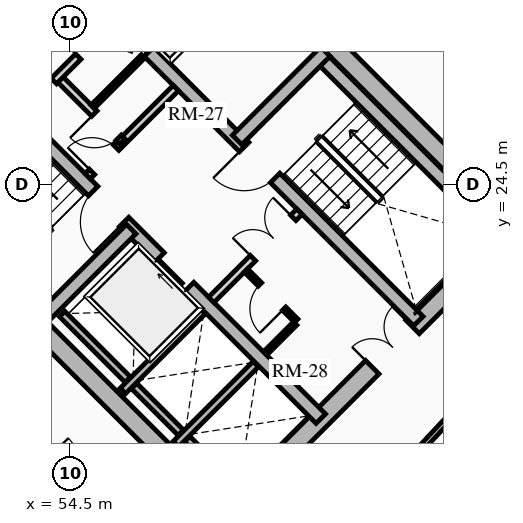
"""IFC4 building model, lengths in metres.
Left out: names, types, materials, properties, quantities, classifications, styles, units other than length and angle.
Written with IfcOpenShell. Run it as: python <this file> out.ifc"""

import sys

from ifc_helpers import new_model, si_unit, direction, frame, frame_2d, origin, place, context, subcontext, project, spatial, rectangle, extrude, source, transform, mapped, element, fill, save


model = new_model("IFC4")
c1 = context("Model", 3, precision=1e-05, world=origin(), true_north=direction((0.0, 1.0)))
c2 = subcontext(c1, "Body", "Model", "MODEL_VIEW")
j1 = project(units=[si_unit("LENGTHUNIT", "METRE"), si_unit("PLANEANGLEUNIT", "RADIAN")], contexts=[c1])
p1 = place(None, origin())
s1 = spatial("IfcSite", under=j1, at=p1, CompositionType="ELEMENT")
p2 = place(p1, origin())
s2 = spatial("IfcBuilding", under=s1, at=p2, CompositionType="ELEMENT")
p3 = place(p2, frame((0.0, 0.0, 36.55)))
s3 = spatial("IfcBuildingStorey", under=s2, at=p3, CompositionType="ELEMENT", Elevation=36.55)
for number, where, z_axis, x_axis in (
    (1, (58.773, 15.661, 0.0), (0.0, 0.0, 1.0), (-0.707, 0.707, 0.0)),
    (2, (66.339, 23.227, 0.0), (0.0, 0.0, 1.0), (-0.707, 0.707, 0.0)),
):
    element("IfcWall", number, at=place(p3, frame(where, z_axis=z_axis, x_axis=x_axis)), inside=s3, PredefinedType="SHEAR", context=c2, shape_type="SweptSolid", body=[
        extrude(rectangle(XDim=14.3, YDim=0.5, at=frame_2d((7.15, 0.0))), origin(), (0.0, 0.0, 1.0), 2.91),
    ])
p4 = place(p3, frame((58.596, 15.838, 0.0), z_axis=(0.0, 0.0, 1.0), x_axis=(0.707106781187, 0.707106781187, 0.0)))
e3 = element("IfcWall", 3, at=p4, inside=s3, PredefinedType="SHEAR", context=c2, shape_type="SweptSolid", body=[
    extrude(rectangle(XDim=10.7, YDim=0.5, at=frame_2d((5.35, 0.0))), origin(), (0.0, 0.0, 1.0), 2.91),
])
m1 = source(origin(), c2, "Body", "SweptSolid", [
    extrude(rectangle(XDim=1.5, YDim=2.02, at=frame_2d((0.75, 1.01))), frame((0.0, 0.26, 0.0), z_axis=(0.0, -1.0, 0.0), x_axis=(1.0, 0.0, 0.0)), (0.0, 0.0, 1.0), 0.52),
])
p5 = place(p4, frame((5.45, 0.0, 0.0)))
e4 = element("IfcOpeningElement", 4, at=p5, cuts=e3, PredefinedType="OPENING", context=c2, shape_type="MappedRepresentation", body=[
    mapped(m1, transform((0.0, 0.0, 0.0), x_axis=(1.0, 0.0, 0.0), y_axis=(0.0, 1.0, 0.0), z_axis=(0.0, 0.0, 1.0), scale=1.0)),
])
p6 = place(p3, frame((48.838, 25.596, 0.0), z_axis=(0.0, 0.0, 1.0), x_axis=(0.707106781187, 0.707106781187, 0.0)))
e5 = element("IfcWall", 5, at=p6, inside=s3, PredefinedType="SHEAR", context=c2, shape_type="SweptSolid", body=[
    extrude(rectangle(XDim=10.7, YDim=0.5, at=frame_2d((5.35, 0.0))), origin(), (0.0, 0.0, 1.0), 2.91),
])
p7 = place(p6, frame((4.6, 0.0, 0.0)))
e6 = element("IfcOpeningElement", 6, at=p7, cuts=e5, PredefinedType="OPENING", context=c2, shape_type="MappedRepresentation", body=[
    mapped(m1, transform((0.0, 0.0, 0.0), x_axis=(1.0, 0.0, 0.0), y_axis=(0.0, 1.0, 0.0), z_axis=(0.0, 0.0, 1.0), scale=1.0)),
])
p8 = place(p3, frame((61.096, 18.338, 0.0), z_axis=(0.0, 0.0, 1.0), x_axis=(-0.707106781187, 0.707106781187, 0.0)))
e7 = element("IfcWall", 7, at=p8, inside=s3, PredefinedType="SHEAR", context=c2, shape_type="SweptSolid", body=[
    extrude(rectangle(XDim=13.8, YDim=0.35, at=frame_2d((6.9, 0.0))), origin(), (0.0, 0.0, 1.0), 2.91),
])
m2 = source(origin(), c2, "Body", "SweptSolid", [
    extrude(rectangle(XDim=1.1, YDim=2.015, at=frame_2d((0.55, 1.007))), frame((0.0, 0.185, 0.0), z_axis=(0.0, -1.0, 0.0), x_axis=(1.0, 0.0, 0.0)), (0.0, 0.0, 1.0), 0.37),
])
p9 = place(p8, frame((4.9, 0.0, 0.0)))
e8 = element("IfcOpeningElement", 8, at=p9, cuts=e7, PredefinedType="OPENING", context=c2, shape_type="MappedRepresentation", body=[
    mapped(m2, transform((0.0, 0.0, 0.0), x_axis=(1.0, 0.0, 0.0), y_axis=(0.0, 1.0, 0.0), z_axis=(0.0, 0.0, 1.0), scale=1.0)),
])
m3 = source(origin(), c2, "Body", "SweptSolid", [
    extrude(rectangle(XDim=1.15, YDim=2.02, at=frame_2d((0.575, 1.01))), frame((0.0, 0.185, 0.0), z_axis=(0.0, -1.0, 0.0), x_axis=(1.0, 0.0, 0.0)), (0.0, 0.0, 1.0), 0.37),
])
p10 = place(p8, frame((7.32, 0.0, 0.0)))
e9 = element("IfcOpeningElement", 9, at=p10, cuts=e7, PredefinedType="OPENING", context=c2, shape_type="MappedRepresentation", body=[
    mapped(m3, transform((0.0, 0.0, 0.0), x_axis=(1.0, 0.0, 0.0), y_axis=(0.0, 1.0, 0.0), z_axis=(0.0, 0.0, 1.0), scale=1.0)),
])
p11 = place(p3, frame((63.662, 20.904, 0.0), z_axis=(0.0, 0.0, 1.0), x_axis=(-0.707106781187, 0.707106781187, 0.0)))
e10 = element("IfcWall", 10, at=p11, inside=s3, PredefinedType="SHEAR", context=c2, shape_type="SweptSolid", body=[
    extrude(rectangle(XDim=13.8, YDim=0.35, at=frame_2d((6.9, 0.0))), origin(), (0.0, 0.0, 1.0), 2.91),
])
p12 = place(p11, frame((10.025, 0.0, 0.0)))
e11 = element("IfcOpeningElement", 11, at=p12, cuts=e10, PredefinedType="OPENING", context=c2, shape_type="MappedRepresentation", body=[
    mapped(m2, transform((0.0, 0.0, 0.0), x_axis=(1.0, 0.0, 0.0), y_axis=(0.0, 1.0, 0.0), z_axis=(0.0, 0.0, 1.0), scale=1.0)),
])
p13 = place(p11, frame((12.025, 0.0, 0.0)))
e12 = element("IfcOpeningElement", 12, at=p13, cuts=e10, PredefinedType="OPENING", context=c2, shape_type="MappedRepresentation", body=[
    mapped(m2, transform((0.0, 0.0, 0.0), x_axis=(1.0, 0.0, 0.0), y_axis=(0.0, 1.0, 0.0), z_axis=(0.0, 0.0, 1.0), scale=1.0)),
])
p14 = place(p11, frame((5.33, 0.0, 0.0)))
e13 = element("IfcOpeningElement", 13, at=p14, cuts=e10, PredefinedType="OPENING", context=c2, shape_type="MappedRepresentation", body=[
    mapped(m3, transform((0.0, 0.0, 0.0), x_axis=(1.0, 0.0, 0.0), y_axis=(0.0, 1.0, 0.0), z_axis=(0.0, 0.0, 1.0), scale=1.0)),
])
p15 = place(p3, frame((53.922, 21.141, 0.0), z_axis=(0.0, 0.0, 1.0), x_axis=(-0.707106781187, 0.707106781187, 0.0)))
e14 = element("IfcWall", 14, at=p15, inside=s3, PredefinedType="SHEAR", context=c2, shape_type="SweptSolid", body=[
    extrude(rectangle(XDim=6.745, YDim=0.35, at=frame_2d((3.373, 0.0))), origin(), (0.0, 0.0, 1.0), 2.91),
])
p16 = place(p3, frame((53.784, 21.003, 0.0), z_axis=(0.0, 0.0, 1.0), x_axis=(0.707106781187, 0.707106781187, 0.0)))
e15 = element("IfcWall", 15, at=p16, inside=s3, PredefinedType="SHEAR", context=c2, shape_type="SweptSolid", body=[
    extrude(rectangle(XDim=3.285, YDim=0.35, at=frame_2d((1.643, 0.0))), origin(), (0.0, 0.0, 1.0), 2.91),
])
p17 = place(p3, frame((65.847, 23.089, 0.0), z_axis=(0.0, 0.0, 1.0), x_axis=(-0.707106781187, 0.707106781187, 0.0)))
e16 = element("IfcWall", 16, at=p17, inside=s3, PredefinedType="SHEAR", context=c2, shape_type="SweptSolid", body=[
    extrude(rectangle(XDim=6.745, YDim=0.35, at=frame_2d((3.373, 0.0))), origin(), (0.0, 0.0, 1.0), 2.91),
])
p18 = place(p3, frame((58.893, 25.674, 0.0), z_axis=(0.0, 0.0, 1.0), x_axis=(0.707106781187, 0.707106781187, 0.0)))
e17 = element("IfcWall", 17, at=p18, inside=s3, PredefinedType="SHEAR", context=c2, shape_type="SweptSolid", body=[
    extrude(rectangle(XDim=3.285, YDim=0.35, at=frame_2d((1.643, 0.0))), origin(), (0.0, 0.0, 1.0), 2.91),
])
p19 = place(p3, frame((55.888, 19.069, 0.0), z_axis=(0.0, 0.0, 1.0), x_axis=(0.707106781187, 0.707106781187, 0.0)))
e18 = element("IfcWall", 18, at=p19, inside=s3, PredefinedType="SHEAR", context=c2, shape_type="SweptSolid", body=[
    extrude(rectangle(XDim=2.97, YDim=0.2, at=frame_2d((1.485, 0.0))), origin(), (0.0, 0.0, 1.0), 2.91),
])
p20 = place(p3, frame((56.015, 19.366, 0.0), z_axis=(0.0, 0.0, 1.0), x_axis=(-0.707106781187, 0.707106781187, 0.0)))
e19 = element("IfcWall", 19, at=p20, inside=s3, PredefinedType="SHEAR", context=c2, shape_type="SweptSolid", body=[
    extrude(rectangle(XDim=2.44, YDim=0.2, at=frame_2d((1.22, 0.0))), origin(), (0.0, 0.0, 1.0), 2.91),
])
p21 = place(p3, frame((57.284, 17.673, 0.0), z_axis=(0.0, 0.0, 1.0), x_axis=(0.707147878904, 0.70706568108, 0.0)))
e20 = element("IfcWall", 20, at=p21, inside=s3, PredefinedType="SHEAR", context=c2, shape_type="SweptSolid", body=[
    extrude(rectangle(XDim=2.97, YDim=0.2, at=frame_2d((1.485, 0.0))), origin(), (0.0, 0.0, 1.0), 2.91),
])
p22 = place(p3, frame((57.412, 17.97, 0.0), z_axis=(0.0, 0.0, 1.0), x_axis=(-0.707106781187, 0.707106781187, 0.0)))
e21 = element("IfcWall", 21, at=p22, inside=s3, PredefinedType="SHEAR", context=c2, shape_type="SweptSolid", body=[
    extrude(rectangle(XDim=1.735, YDim=0.2, at=frame_2d((0.867, 0.0))), origin(), (0.0, 0.0, 1.0), 2.91),
])
p23 = place(p3, frame((58.737, 16.644, 0.0), z_axis=(0.0, 0.0, 1.0), x_axis=(-0.707032117043, 0.707181437447, 0.0)))
e22 = element("IfcWall", 22, at=p23, inside=s3, PredefinedType="SHEAR", context=c2, shape_type="SweptSolid", body=[
    extrude(rectangle(XDim=1.635, YDim=0.2, at=frame_2d((0.817, 0.0))), origin(), (0.0, 0.0, 1.0), 2.91),
])
p24 = place(p3, frame((57.062, 27.781, 0.0), z_axis=(0.0, 0.0, 1.0), x_axis=(0.707106781187, 0.707106781187, 0.0)))
e23 = element("IfcWall", 23, at=p24, inside=s3, PredefinedType="SHEAR", context=c2, shape_type="SweptSolid", body=[
    extrude(rectangle(XDim=2.97, YDim=0.2, at=frame_2d((1.485, 0.0))), origin(), (0.0, 0.0, 1.0), 2.91),
])
p25 = place(p3, frame((58.214, 21.467, 0.0), z_axis=(0.0, 0.0, 1.0), x_axis=(0.707106781187, 0.707106781187, 0.0)))
e24 = element("IfcWall", 24, at=p25, inside=s3, PredefinedType="PARTITIONING", context=c2, shape_type="SweptSolid", body=[
    extrude(rectangle(XDim=3.28, YDim=0.2, at=frame_2d((1.64, 0.0))), origin(), (0.0, 0.0, 1.0), 2.635),
])
m4 = source(origin(), c2, "Body", "SweptSolid", [
    extrude(rectangle(XDim=1.5, YDim=2.02, at=frame_2d((0.75, 1.01))), frame((0.0, 0.11, 0.0), z_axis=(0.0, -1.0, 0.0), x_axis=(1.0, 0.0, 0.0)), (0.0, 0.0, 1.0), 0.22),
])
p26 = place(p25, frame((1.55, 0.0, 0.0)))
e25 = element("IfcOpeningElement", 25, at=p26, cuts=e24, PredefinedType="OPENING", context=c2, shape_type="MappedRepresentation", body=[
    mapped(m4, transform((0.0, 0.0, 0.0), x_axis=(1.0, 0.0, 0.0), y_axis=(0.0, 1.0, 0.0), z_axis=(0.0, 0.0, 1.0), scale=1.0)),
])
p27 = place(p3, frame((54.961, 24.719, 0.0), z_axis=(0.0, 0.0, 1.0), x_axis=(0.707106781187, 0.707106781187, 0.0)))
e26 = element("IfcWall", 26, at=p27, inside=s3, PredefinedType="PARTITIONING", context=c2, shape_type="SweptSolid", body=[
    extrude(rectangle(XDim=3.28, YDim=0.2, at=frame_2d((1.64, 0.0))), origin(), (0.0, 0.0, 1.0), 2.635),
])
m5 = source(origin(), c2, "Body", "SweptSolid", [
    extrude(rectangle(XDim=0.9, YDim=2.005, at=frame_2d((0.45, 1.002))), frame((0.0, 0.11, 0.0), z_axis=(0.0, -1.0, 0.0), x_axis=(1.0, 0.0, 0.0)), (0.0, 0.0, 1.0), 0.22),
])
p28 = place(p27, frame((0.16, 0.0, 0.0)))
e27 = element("IfcOpeningElement", 27, at=p28, cuts=e26, PredefinedType="OPENING", context=c2, shape_type="MappedRepresentation", body=[
    mapped(m5, transform((0.0, 0.0, 0.0), x_axis=(1.0, 0.0, 0.0), y_axis=(0.0, 1.0, 0.0), z_axis=(0.0, 0.0, 1.0), scale=1.0)),
])
p29 = place(p3, frame((55.874, 25.631, 0.0), z_axis=(0.0, 0.0, 1.0), x_axis=(-0.707157639372, 0.707055919343, 0.0)))
e28 = element("IfcWall", 28, at=p29, inside=s3, PredefinedType="PARTITIONING", context=c2, shape_type="SweptSolid", body=[
    extrude(rectangle(XDim=2.4, YDim=0.2, at=frame_2d((1.2, 0.0))), origin(), (0.0, 0.0, 1.0), 2.635),
])
p30 = place(p29, frame((0.14, 0.0, 0.0)))
e29 = element("IfcOpeningElement", 29, at=p30, cuts=e28, PredefinedType="OPENING", context=c2, shape_type="MappedRepresentation", body=[
    mapped(m5, transform((0.0, 0.0, 0.0), x_axis=(1.0, 0.0, 0.0), y_axis=(0.0, 1.0, 0.0), z_axis=(0.0, 0.0, 1.0), scale=1.0)),
])
p31 = place(p3, frame((53.264, 26.416, 0.0), z_axis=(0.0, 0.0, 1.0), x_axis=(0.707106781187, 0.707106781187, 0.0)))
e30 = element("IfcWall", 30, at=p31, inside=s3, PredefinedType="PARTITIONING", context=c2, shape_type="SweptSolid", body=[
    extrude(rectangle(XDim=3.28, YDim=0.2, at=frame_2d((1.64, 0.0))), origin(), (0.0, 0.0, 1.0), 2.635),
])
m6 = source(origin(), c2, "Body", "SweptSolid", [
    extrude(rectangle(XDim=1.0, YDim=2.015, at=frame_2d((0.5, 1.007))), frame((0.0, 0.11, 0.0), z_axis=(0.0, -1.0, 0.0), x_axis=(1.0, 0.0, 0.0)), (0.0, 0.0, 1.0), 0.22),
])
p32 = place(p31, frame((0.14, 0.0, 0.0)))
e31 = element("IfcOpeningElement", 31, at=p32, cuts=e30, PredefinedType="OPENING", context=c2, shape_type="MappedRepresentation", body=[
    mapped(m6, transform((0.0, 0.0, 0.0), x_axis=(1.0, 0.0, 0.0), y_axis=(0.0, 1.0, 0.0), z_axis=(0.0, 0.0, 1.0), scale=1.0)),
])
p33 = place(p31, frame((2.05, 0.0, 0.0)))
e32 = element("IfcOpeningElement", 32, at=p33, cuts=e30, PredefinedType="OPENING", context=c2, shape_type="MappedRepresentation", body=[
    mapped(m5, transform((0.0, 0.0, 0.0), x_axis=(1.0, 0.0, 0.0), y_axis=(0.0, 1.0, 0.0), z_axis=(0.0, 0.0, 1.0), scale=1.0)),
])
p34 = place(p3, frame((60.448, 20.915, 0.0), z_axis=(0.0, 0.0, 1.0), x_axis=(-0.707106781187, 0.707106781187, 0.0)))
e33 = element("IfcWall", 33, at=p34, inside=s3, PredefinedType="PARTITIONING", context=c2, shape_type="SweptSolid", body=[
    extrude(rectangle(XDim=1.87, YDim=0.125, at=frame_2d((0.935, 0.0))), origin(), (0.0, 0.0, 1.0), 2.635),
])
m7 = source(origin(), c2, "Body", "SweptSolid", [
    extrude(rectangle(XDim=0.9, YDim=2.005, at=frame_2d((0.45, 1.002))), frame((0.0, 0.073, 0.0), z_axis=(0.0, -1.0, 0.0), x_axis=(1.0, 0.0, 0.0)), (0.0, 0.0, 1.0), 0.145),
])
p35 = place(p34, frame((0.45, 0.0, 0.0)))
e34 = element("IfcOpeningElement", 34, at=p35, cuts=e33, PredefinedType="OPENING", context=c2, shape_type="MappedRepresentation", body=[
    mapped(m7, transform((0.0, 0.0, 0.0), x_axis=(1.0, 0.0, 0.0), y_axis=(0.0, 1.0, 0.0), z_axis=(0.0, 0.0, 1.0), scale=1.0)),
])
p36 = place(p3, frame((59.643, 20.066, 0.0), z_axis=(0.0, 0.0, 1.0), x_axis=(0.707106781187, 0.707106781187, 0.0)))
e35 = element("IfcWall", 35, at=p36, inside=s3, PredefinedType="PARTITIONING", context=c2, shape_type="SweptSolid", body=[
    extrude(rectangle(XDim=1.1, YDim=0.125, at=frame_2d((0.55, 0.0))), origin(), (0.0, 0.0, 1.0), 2.635),
])
p37 = place(p3, frame((55.089, 26.543, 0.0), z_axis=(0.0, 0.0, 1.0), x_axis=(0.707106781187, 0.707106781187, 0.0)))
e36 = element("IfcWall", 36, at=p37, inside=s3, PredefinedType="PARTITIONING", context=c2, shape_type="SweptSolid", body=[
    extrude(rectangle(XDim=1.88, YDim=0.125, at=frame_2d((0.94, 0.0))), origin(), (0.0, 0.0, 1.0), 2.635),
])
p38 = place(p3, frame((51.914, 18.914, 0.0), z_axis=(0.0, 0.0, 1.0), x_axis=(0.699999313799, -0.714143515465, 0.0)))
e37 = element("IfcWall", 37, at=p38, inside=s3, PredefinedType="PARTITIONING", context=c2, shape_type="SweptSolid", body=[
    extrude(rectangle(XDim=6.162, YDim=0.15, at=frame_2d((3.081, 0.0))), origin(), (0.0, 0.0, 1.0), 2.159),
])
m8 = source(origin(), c2, "Body", "SweptSolid", [
    extrude(rectangle(XDim=1.05, YDim=2.015, at=frame_2d((0.525, 1.007))), frame((0.0, 0.085, 0.0), z_axis=(0.0, -1.0, 0.0), x_axis=(1.0, 0.0, 0.0)), (0.0, 0.0, 1.0), 0.17),
])
p39 = place(p38, frame((2.556, 0.0, 0.0)))
e38 = element("IfcOpeningElement", 38, at=p39, cuts=e37, PredefinedType="OPENING", context=c2, shape_type="MappedRepresentation", body=[
    mapped(m8, transform((0.0, 0.0, 0.0), x_axis=(1.0, 0.0, 0.0), y_axis=(0.0, 1.0, 0.0), z_axis=(0.0, 0.0, 1.0), scale=1.0)),
])
p40 = place(p3, frame((62.903, 16.667, 0.0), z_axis=(0.0, 0.0, 1.0), x_axis=(0.682371947497, 0.731005147225, 0.0)))
e39 = element("IfcWall", 39, at=p40, inside=s3, PredefinedType="PARTITIONING", context=c2, shape_type="SweptSolid", body=[
    extrude(rectangle(XDim=6.642, YDim=0.15, at=frame_2d((3.321, 0.0))), origin(), (0.0, 0.0, 1.0), 2.159),
])
p41 = place(p3, frame((67.27, 25.78, 0.0), z_axis=(0.0, 0.0, 1.0), x_axis=(-0.696847842907, 0.717218992942, 0.0)))
e40 = element("IfcWall", 40, at=p41, inside=s3, PredefinedType="PARTITIONING", context=c2, shape_type="SweptSolid", body=[
    extrude(rectangle(XDim=6.004, YDim=0.15, at=frame_2d((3.002, 0.0))), origin(), (0.0, 0.0, 1.0), 2.635),
])
m9 = source(origin(), c2, "Body", "SweptSolid", [
    extrude(rectangle(XDim=1.0, YDim=2.015, at=frame_2d((0.5, 1.007))), frame((0.0, 0.085, 0.0), z_axis=(0.0, -1.0, 0.0), x_axis=(1.0, 0.0, 0.0)), (0.0, 0.0, 1.0), 0.17),
])
p42 = place(p41, frame((2.502, 0.0, 0.0)))
e41 = element("IfcOpeningElement", 41, at=p42, cuts=e40, PredefinedType="OPENING", context=c2, shape_type="MappedRepresentation", body=[
    mapped(m9, transform((0.0, 0.0, 0.0), x_axis=(1.0, 0.0, 0.0), y_axis=(0.0, 1.0, 0.0), z_axis=(0.0, 0.0, 1.0), scale=1.0)),
])
m10 = source(origin(), c2, "Body", "SweptSolid", [
    extrude(rectangle(XDim=1.1, YDim=2.015, at=frame_2d((0.55, 1.007))), frame((0.0, 0.025, 0.0), z_axis=(0.0, -1.0, 0.0), x_axis=(1.0, 0.0, 0.0)), (0.0, 0.0, 1.0), 0.05),
])
p43 = place(p9, origin())
e42 = element("IfcDoor", 42, at=p43, inside=s3, OperationType="SLIDING_TO_RIGHT", PredefinedType="DOOR", context=c2, shape_type="MappedRepresentation", body=[
    mapped(m10, transform((0.0, 0.0, 0.0), x_axis=(1.0, 0.0, 0.0), y_axis=(0.0, 1.0, 0.0), z_axis=(0.0, 0.0, 1.0), scale=1.0)),
])
fill(e8, e42)
m11 = source(origin(), c2, "Body", "SweptSolid", [
    extrude(rectangle(XDim=1.15, YDim=2.02, at=frame_2d((0.575, 1.01))), frame((0.0, 0.025, 0.0), z_axis=(0.0, -1.0, 0.0), x_axis=(1.0, 0.0, 0.0)), (0.0, 0.0, 1.0), 0.05),
])
p44 = place(p10, origin())
e43 = element("IfcDoor", 43, at=p44, inside=s3, OperationType="SINGLE_SWING_LEFT", PredefinedType="DOOR", context=c2, shape_type="MappedRepresentation", body=[
    mapped(m11, transform((0.0, 0.0, 0.0), x_axis=(1.0, 0.0, 0.0), y_axis=(0.0, 1.0, 0.0), z_axis=(0.0, 0.0, 1.0), scale=1.0)),
])
fill(e9, e43)
p45 = place(p14, origin())
e44 = element("IfcDoor", 44, at=p45, inside=s3, OperationType="SINGLE_SWING_RIGHT", PredefinedType="DOOR", context=c2, shape_type="MappedRepresentation", body=[
    mapped(m11, transform((0.0, 0.0, 0.0), x_axis=(1.0, 0.0, 0.0), y_axis=(0.0, 1.0, 0.0), z_axis=(0.0, 0.0, 1.0), scale=1.0)),
])
fill(e13, e44)
m12 = source(origin(), c2, "Body", "SweptSolid", [
    extrude(rectangle(XDim=1.5, YDim=2.02, at=frame_2d((0.75, 1.01))), frame((0.0, 0.025, 0.0), z_axis=(0.0, -1.0, 0.0), x_axis=(1.0, 0.0, 0.0)), (0.0, 0.0, 1.0), 0.05),
])
p46 = place(p5, origin())
e45 = element("IfcDoor", 45, at=p46, inside=s3, OperationType="DOUBLE_DOOR_SINGLE_SWING", PredefinedType="DOOR", context=c2, shape_type="MappedRepresentation", body=[
    mapped(m12, transform((0.0, 0.0, 0.0), x_axis=(1.0, 0.0, 0.0), y_axis=(0.0, 1.0, 0.0), z_axis=(0.0, 0.0, 1.0), scale=1.0)),
])
fill(e4, e45)
p47 = place(p26, origin())
e46 = element("IfcDoor", 46, at=p47, inside=s3, OperationType="DOUBLE_DOOR_SINGLE_SWING", PredefinedType="DOOR", context=c2, shape_type="MappedRepresentation", body=[
    mapped(m12, transform((0.0, 0.0, 0.0), x_axis=(1.0, 0.0, 0.0), y_axis=(0.0, 1.0, 0.0), z_axis=(0.0, 0.0, 1.0), scale=1.0)),
])
fill(e25, e46)
m13 = source(origin(), c2, "Body", "SweptSolid", [
    extrude(rectangle(XDim=0.9, YDim=2.005, at=frame_2d((0.45, 1.002))), frame((0.0, 0.025, 0.0), z_axis=(0.0, -1.0, 0.0), x_axis=(1.0, 0.0, 0.0)), (0.0, 0.0, 1.0), 0.05),
])
p48 = place(p28, origin())
e47 = element("IfcDoor", 47, at=p48, inside=s3, OperationType="SINGLE_SWING_LEFT", PredefinedType="DOOR", context=c2, shape_type="MappedRepresentation", body=[
    mapped(m13, transform((0.0, 0.0, 0.0), x_axis=(1.0, 0.0, 0.0), y_axis=(0.0, 1.0, 0.0), z_axis=(0.0, 0.0, 1.0), scale=1.0)),
])
fill(e27, e47)
m14 = source(origin(), c2, "Body", "SweptSolid", [
    extrude(rectangle(XDim=1.0, YDim=2.015, at=frame_2d((0.5, 1.007))), frame((0.0, 0.025, 0.0), z_axis=(0.0, -1.0, 0.0), x_axis=(1.0, 0.0, 0.0)), (0.0, 0.0, 1.0), 0.05),
])
p49 = place(p32, origin())
e48 = element("IfcDoor", 48, at=p49, inside=s3, OperationType="SINGLE_SWING_RIGHT", PredefinedType="DOOR", context=c2, shape_type="MappedRepresentation", body=[
    mapped(m14, transform((0.0, 0.0, 0.0), x_axis=(1.0, 0.0, 0.0), y_axis=(0.0, 1.0, 0.0), z_axis=(0.0, 0.0, 1.0), scale=1.0)),
])
fill(e31, e48)
p50 = place(p35, origin())
e49 = element("IfcDoor", 49, at=p50, inside=s3, OperationType="SINGLE_SWING_LEFT", PredefinedType="DOOR", context=c2, shape_type="MappedRepresentation", body=[
    mapped(m13, transform((0.0, 0.0, 0.0), x_axis=(1.0, 0.0, 0.0), y_axis=(0.0, 1.0, 0.0), z_axis=(0.0, 0.0, 1.0), scale=1.0)),
])
fill(e34, e49)
p51 = place(p30, origin())
e50 = element("IfcDoor", 50, at=p51, inside=s3, OperationType="SINGLE_SWING_RIGHT", PredefinedType="DOOR", context=c2, shape_type="MappedRepresentation", body=[
    mapped(m13, transform((0.0, 0.0, 0.0), x_axis=(1.0, 0.0, 0.0), y_axis=(0.0, 1.0, 0.0), z_axis=(0.0, 0.0, 1.0), scale=1.0)),
])
fill(e29, e50)
p52 = place(p33, origin())
e51 = element("IfcDoor", 51, at=p52, inside=s3, OperationType="SINGLE_SWING_LEFT", PredefinedType="DOOR", context=c2, shape_type="MappedRepresentation", body=[
    mapped(m13, transform((0.0, 0.0, 0.0), x_axis=(1.0, 0.0, 0.0), y_axis=(0.0, 1.0, 0.0), z_axis=(0.0, 0.0, 1.0), scale=1.0)),
])
fill(e32, e51)
save(model, sys.argv[1])
